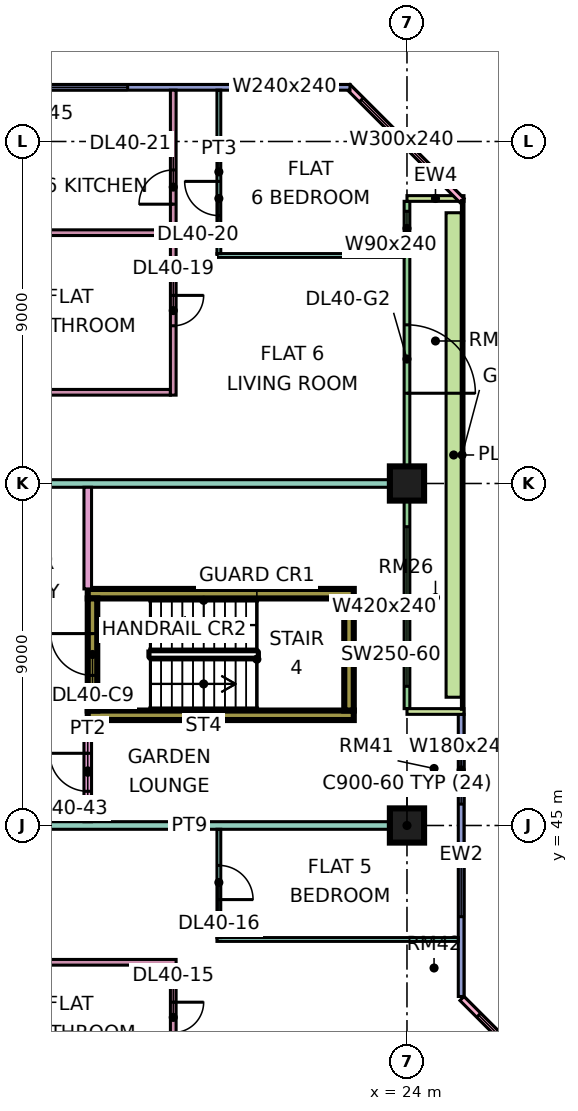
"""IFC4 building model, lengths in metres.
Left out: names, types, materials, properties, quantities, classifications, styles, units other than length and angle.
Written with IfcOpenShell. Run it as: python <this file> out.ifc"""

import sys

from ifc_helpers import new_model, si_unit, direction, frame, frame_2d, origin, origin_2d, place, context, subcontext, project, spatial, rectangle, extrude, element, fill, save


model = new_model("IFC4")
c1 = context("Model", 3, precision=1e-05, world=origin(), true_north=direction((0.0, 1.0)))
c2 = subcontext(c1, "Body", "Model", "MODEL_VIEW")
j1 = project(units=[si_unit("LENGTHUNIT", "METRE"), si_unit("PLANEANGLEUNIT", "RADIAN")], contexts=[c1])
p1 = place(None, origin())
s1 = spatial("IfcSite", under=j1, at=p1, CompositionType="ELEMENT")
p2 = place(p1, origin())
s2 = spatial("IfcBuilding", under=s1, at=p2, CompositionType="ELEMENT")
p3 = place(p2, frame((0.0, 0.0, 176.15)))
s3 = spatial("IfcBuildingStorey", under=s2, at=p3, CompositionType="ELEMENT", Elevation=176.15)
for number, where, z_axis, x_axis in (
    (1, (24.0, 45.0, 0.0), (0.0, 0.0, 1.0), (1.0, 0.0, 0.0)),
    (2, (24.0, 54.0, 0.0), (0.0, 0.0, 1.0), (1.0, 0.0, 0.0)),
):
    element("IfcColumn", number, at=place(p3, frame(where, z_axis=z_axis, x_axis=x_axis)), inside=s3, PredefinedType="COLUMN", context=c2, shape_type="SweptSolid", body=[
        extrude(rectangle(XDim=0.9, YDim=0.9, at=origin_2d()), origin(), (0.0, 0.0, 1.0), 3.75),
    ])
for number, where, z_axis, x_axis in (
    (3, (15.6, 47.9, 0.0), (0.0, 0.0, 1.0), (1.0, 0.0, 0.0)),
    (4, (15.6, 51.1, 0.0), (0.0, 0.0, 1.0), (1.0, 0.0, 0.0)),
):
    element("IfcWall", number, at=place(p3, frame(where, z_axis=z_axis, x_axis=x_axis)), inside=s3, PredefinedType="SHEAR", context=c2, shape_type="SweptSolid", body=[
        extrude(rectangle(XDim=7.0, YDim=0.25, at=frame_2d((3.5, 0.0))), origin(), (0.0, 0.0, 1.0), 3.75),
    ])
p4 = place(p3, frame((15.725, 48.025, 0.0), z_axis=(0.0, 0.0, 1.0), x_axis=(0.0, 1.0, 0.0)))
e5 = element("IfcWall", 5, at=p4, inside=s3, PredefinedType="SHEAR", context=c2, shape_type="SweptSolid", body=[
    extrude(rectangle(XDim=2.95, YDim=0.25, at=frame_2d((1.475, 0.0))), origin(), (0.0, 0.0, 1.0), 3.75),
])
p5 = place(p4, frame((0.925, 0.0, 0.0)))
e6 = element("IfcOpeningElement", 6, at=p5, cuts=e5, PredefinedType="OPENING", context=c2, shape_type="SweptSolid", body=[
    extrude(rectangle(XDim=1.1, YDim=2.2, at=frame_2d((0.55, 1.1))), frame((0.0, 0.135, 0.0), z_axis=(0.0, -1.0, 0.0), x_axis=(1.0, 0.0, 0.0)), (0.0, 0.0, 1.0), 0.27),
])
p6 = place(p3, frame((22.475, 48.025, 0.0), z_axis=(0.0, 0.0, 1.0), x_axis=(0.0, 1.0, 0.0)))
e7 = element("IfcWall", 7, at=p6, inside=s3, PredefinedType="SHEAR", context=c2, shape_type="SweptSolid", body=[
    extrude(rectangle(XDim=2.95, YDim=0.25, at=frame_2d((1.475, 0.0))), origin(), (0.0, 0.0, 1.0), 3.75),
])
p7 = place(p3, frame((28.447, 37.447, 0.0), z_axis=(0.0, 0.0, 1.0), x_axis=(-0.707106781187, 0.707106781187, 0.0)))
e8 = element("IfcWall", 8, at=p7, inside=s3, PredefinedType="SOLIDWALL", context=c2, shape_type="SweptSolid", body=[
    extrude(rectangle(XDim=4.243, YDim=0.15, at=frame_2d((2.121, 0.0))), origin(), (0.0, 0.0, 1.0), 3.35),
])
p8 = place(p7, frame((0.621, 0.0, 0.45)))
e9 = element("IfcOpeningElement", 9, at=p8, cuts=e8, PredefinedType="OPENING", context=c2, shape_type="SweptSolid", body=[
    extrude(rectangle(XDim=3.0, YDim=2.4, at=frame_2d((1.5, 1.2))), frame((0.0, 0.085, 0.0), z_axis=(0.0, -1.0, 0.0), x_axis=(1.0, 0.0, 0.0)), (0.0, 0.0, 1.0), 0.17),
])
p9 = place(p3, frame((25.425, 40.5, 0.0), z_axis=(0.0, 0.0, 1.0), x_axis=(0.0, 1.0, 0.0)))
e10 = element("IfcWall", 10, at=p9, inside=s3, PredefinedType="SOLIDWALL", context=c2, shape_type="SweptSolid", body=[
    extrude(rectangle(XDim=7.425, YDim=0.15, at=frame_2d((3.712, 0.0))), origin(), (0.0, 0.0, 1.0), 3.35),
])
p10 = place(p9, frame((2.1, 0.0, 0.45)))
e11 = element("IfcOpeningElement", 11, at=p10, cuts=e10, PredefinedType="OPENING", context=c2, shape_type="SweptSolid", body=[
    extrude(rectangle(XDim=1.8, YDim=2.4, at=frame_2d((0.9, 1.2))), frame((0.0, 0.085, 0.0), z_axis=(0.0, -1.0, 0.0), x_axis=(1.0, 0.0, 0.0)), (0.0, 0.0, 1.0), 0.17),
])
p11 = place(p9, frame((5.062, 0.0, 0.45)))
e12 = element("IfcOpeningElement", 12, at=p11, cuts=e10, PredefinedType="OPENING", context=c2, shape_type="SweptSolid", body=[
    extrude(rectangle(XDim=1.8, YDim=2.4, at=frame_2d((0.9, 1.2))), frame((0.0, 0.085, 0.0), z_axis=(0.0, -1.0, 0.0), x_axis=(1.0, 0.0, 0.0)), (0.0, 0.0, 1.0), 0.17),
])
p12 = place(p3, frame((24.0, 48.075, 0.0), z_axis=(0.0, 0.0, 1.0), x_axis=(0.0, 1.0, 0.0)))
e13 = element("IfcWall", 13, at=p12, inside=s3, PredefinedType="SOLIDWALL", context=c2, shape_type="SweptSolid", body=[
    extrude(rectangle(XDim=13.35, YDim=0.15, at=frame_2d((6.675, 0.0))), origin(), (0.0, 0.0, 1.0), 3.35),
])
p13 = place(p12, frame((0.587, 0.0, 0.45)))
e14 = element("IfcOpeningElement", 14, at=p13, cuts=e13, PredefinedType="OPENING", context=c2, shape_type="SweptSolid", body=[
    extrude(rectangle(XDim=4.2, YDim=2.4, at=frame_2d((2.1, 1.2))), frame((0.0, 0.085, 0.0), z_axis=(0.0, -1.0, 0.0), x_axis=(1.0, 0.0, 0.0)), (0.0, 0.0, 1.0), 0.17),
])
p14 = place(p12, frame((8.3, 0.0, 0.0)))
e15 = element("IfcOpeningElement", 15, at=p14, cuts=e13, PredefinedType="OPENING", context=c2, shape_type="SweptSolid", body=[
    extrude(rectangle(XDim=1.8, YDim=2.4, at=frame_2d((0.9, 1.2))), frame((0.0, 0.085, 0.0), z_axis=(0.0, -1.0, 0.0), x_axis=(1.0, 0.0, 0.0)), (0.0, 0.0, 1.0), 0.17),
])
p15 = place(p12, frame((12.188, 0.0, 0.45)))
e16 = element("IfcOpeningElement", 16, at=p15, cuts=e13, PredefinedType="OPENING", context=c2, shape_type="SweptSolid", body=[
    extrude(rectangle(XDim=0.9, YDim=2.4, at=frame_2d((0.45, 1.2))), frame((0.0, 0.085, 0.0), z_axis=(0.0, -1.0, 0.0), x_axis=(1.0, 0.0, 0.0)), (0.0, 0.0, 1.0), 0.17),
])
for number, where, z_axis, x_axis in (
    (17, (25.5, 48.0, 0.0), (0.0, 0.0, 1.0), (-1.0, 0.0, 0.0)),
    (18, (25.5, 61.5, 0.0), (0.0, 0.0, 1.0), (-1.0, 0.0, 0.0)),
):
    element("IfcWall", number, at=place(p3, frame(where, z_axis=z_axis, x_axis=x_axis)), inside=s3, PredefinedType="SOLIDWALL", context=c2, shape_type="SweptSolid", body=[
        extrude(rectangle(XDim=1.5, YDim=0.15, at=frame_2d((0.75, 0.0))), origin(), (0.0, 0.0, 1.0), 3.35),
    ])
p16 = place(p3, frame((25.447, 61.447, 0.0), z_axis=(0.0, 0.0, 1.0), x_axis=(-0.707106781187, 0.707106781187, 0.0)))
e19 = element("IfcWall", 19, at=p16, inside=s3, PredefinedType="SOLIDWALL", context=c2, shape_type="SweptSolid", body=[
    extrude(rectangle(XDim=4.243, YDim=0.15, at=frame_2d((2.121, 0.0))), origin(), (0.0, 0.0, 1.0), 3.35),
])
p17 = place(p16, frame((0.744, 0.0, 0.45)))
e20 = element("IfcOpeningElement", 20, at=p17, cuts=e19, PredefinedType="OPENING", context=c2, shape_type="SweptSolid", body=[
    extrude(rectangle(XDim=3.0, YDim=2.4, at=frame_2d((1.5, 1.2))), frame((0.0, 0.085, 0.0), z_axis=(0.0, -1.0, 0.0), x_axis=(1.0, 0.0, 0.0)), (0.0, 0.0, 1.0), 0.17),
])
p18 = place(p3, frame((22.5, 64.425, 0.0), z_axis=(0.0, 0.0, 1.0), x_axis=(-1.0, 0.0, 0.0)))
e21 = element("IfcWall", 21, at=p18, inside=s3, PredefinedType="SOLIDWALL", context=c2, shape_type="SweptSolid", body=[
    extrude(rectangle(XDim=10.425, YDim=0.15, at=frame_2d((5.212, 0.0))), origin(), (0.0, 0.0, 1.0), 3.35),
])
p19 = place(p18, frame((0.525, 0.0, 0.45)))
e22 = element("IfcOpeningElement", 22, at=p19, cuts=e21, PredefinedType="OPENING", context=c2, shape_type="SweptSolid", body=[
    extrude(rectangle(XDim=2.4, YDim=2.4, at=frame_2d((1.2, 1.2))), frame((0.0, 0.085, 0.0), z_axis=(0.0, -1.0, 0.0), x_axis=(1.0, 0.0, 0.0)), (0.0, 0.0, 1.0), 0.17),
])
p20 = place(p18, frame((5.85, 0.0, 0.45)))
e23 = element("IfcOpeningElement", 23, at=p20, cuts=e21, PredefinedType="OPENING", context=c2, shape_type="SweptSolid", body=[
    extrude(rectangle(XDim=3.0, YDim=2.4, at=frame_2d((1.5, 1.2))), frame((0.0, 0.085, 0.0), z_axis=(0.0, -1.0, 0.0), x_axis=(1.0, 0.0, 0.0)), (0.0, 0.0, 1.0), 0.17),
])
p21 = place(p3, frame((25.229, 48.375, 0.0), z_axis=(0.0, 0.0, 1.0), x_axis=(0.0, 1.0, 0.0)))
e24 = element("IfcWall", 24, at=p21, inside=s3, PredefinedType="SOLIDWALL", context=c2, shape_type="SweptSolid", body=[
    extrude(rectangle(XDim=12.75, YDim=0.4, at=frame_2d((6.375, 0.0))), origin(), (0.0, 0.0, 1.0), 0.7),
])
p22 = place(p3, frame((12.55, 41.4, 0.0), z_axis=(0.0, 0.0, 1.0), x_axis=(1.0, 0.0, 0.0)))
e25 = element("IfcWall", 25, at=p22, inside=s3, PredefinedType="PARTITIONING", context=c2, shape_type="SweptSolid", body=[
    extrude(rectangle(XDim=5.375, YDim=0.15, at=frame_2d((2.688, 0.0))), origin(), (0.0, 0.0, 1.0), 3.35),
])
p23 = place(p3, frame((12.55, 45.0, 0.0), z_axis=(0.0, 0.0, 1.0), x_axis=(1.0, 0.0, 0.0)))
e26 = element("IfcWall", 26, at=p23, inside=s3, PredefinedType="PARTITIONING", context=c2, shape_type="SweptSolid", body=[
    extrude(rectangle(XDim=11.45, YDim=0.2, at=frame_2d((5.725, 0.0))), origin(), (0.0, 0.0, 1.0), 3.35),
])
p24 = place(p3, frame((12.55, 54.0, 0.0), z_axis=(0.0, 0.0, 1.0), x_axis=(1.0, 0.0, 0.0)))
e27 = element("IfcWall", 27, at=p24, inside=s3, PredefinedType="PARTITIONING", context=c2, shape_type="SweptSolid", body=[
    extrude(rectangle(XDim=11.376, YDim=0.2, at=frame_2d((5.688, 0.0))), origin(), (0.0, 0.0, 1.0), 3.35),
])
for number, where, z_axis, x_axis in (
    (28, (12.55, 56.4, 0.0), (0.0, 0.0, 1.0), (1.0, 0.0, 0.0)),
    (29, (12.55, 60.6, 0.0), (0.0, 0.0, 1.0), (1.0, 0.0, 0.0)),
):
    element("IfcWall", number, at=place(p3, frame(where, z_axis=z_axis, x_axis=x_axis)), inside=s3, PredefinedType="PARTITIONING", context=c2, shape_type="SweptSolid", body=[
        extrude(rectangle(XDim=5.225, YDim=0.15, at=frame_2d((2.612, 0.0))), origin(), (0.0, 0.0, 1.0), 3.35),
    ])
p25 = place(p3, frame((15.6, 45.1, 0.0), z_axis=(0.0, 0.0, 1.0), x_axis=(0.0, 1.0, 0.0)))
e30 = element("IfcWall", 30, at=p25, inside=s3, PredefinedType="PARTITIONING", context=c2, shape_type="SweptSolid", body=[
    extrude(rectangle(XDim=2.675, YDim=0.2, at=frame_2d((1.337, 0.0))), origin(), (0.0, 0.0, 1.0), 3.35),
])
p26 = place(p25, frame((0.8, 0.0, 0.0)))
e31 = element("IfcOpeningElement", 31, at=p26, cuts=e30, PredefinedType="OPENING", context=c2, shape_type="SweptSolid", body=[
    extrude(rectangle(XDim=1.0, YDim=2.1, at=frame_2d((0.5, 1.05))), frame((0.0, 0.11, 0.0), z_axis=(0.0, -1.0, 0.0), x_axis=(1.0, 0.0, 0.0)), (0.0, 0.0, 1.0), 0.22),
])
p27 = place(p3, frame((15.6, 51.225, 0.0), z_axis=(0.0, 0.0, 1.0), x_axis=(0.0, 1.0, 0.0)))
e32 = element("IfcWall", 32, at=p27, inside=s3, PredefinedType="PARTITIONING", context=c2, shape_type="SweptSolid", body=[
    extrude(rectangle(XDim=2.675, YDim=0.2, at=frame_2d((1.337, 0.0))), origin(), (0.0, 0.0, 1.0), 3.35),
])
p28 = place(p3, frame((17.85, 36.1, 0.0), z_axis=(0.0, 0.0, 1.0), x_axis=(0.0, 1.0, 0.0)))
e33 = element("IfcWall", 33, at=p28, inside=s3, PredefinedType="PARTITIONING", context=c2, shape_type="SweptSolid", body=[
    extrude(rectangle(XDim=5.225, YDim=0.15, at=frame_2d((2.612, 0.0))), origin(), (0.0, 0.0, 1.0), 3.35),
])
p29 = place(p28, frame((3.45, 0.0, 0.0)))
e34 = element("IfcOpeningElement", 34, at=p29, cuts=e33, PredefinedType="OPENING", context=c2, shape_type="SweptSolid", body=[
    extrude(rectangle(XDim=0.8, YDim=2.1, at=frame_2d((0.4, 1.05))), frame((0.0, 0.085, 0.0), z_axis=(0.0, -1.0, 0.0), x_axis=(1.0, 0.0, 0.0)), (0.0, 0.0, 1.0), 0.17),
])
p30 = place(p28, frame((0.65, 0.0, 0.0)))
e35 = element("IfcOpeningElement", 35, at=p30, cuts=e33, PredefinedType="OPENING", context=c2, shape_type="SweptSolid", body=[
    extrude(rectangle(XDim=0.9, YDim=2.1, at=frame_2d((0.45, 1.05))), frame((0.0, 0.085, 0.0), z_axis=(0.0, -1.0, 0.0), x_axis=(1.0, 0.0, 0.0)), (0.0, 0.0, 1.0), 0.17),
])
p31 = place(p3, frame((17.85, 56.325, 0.0), z_axis=(0.0, 0.0, 1.0), x_axis=(0.0, 1.0, 0.0)))
e36 = element("IfcWall", 36, at=p31, inside=s3, PredefinedType="PARTITIONING", context=c2, shape_type="SweptSolid", body=[
    extrude(rectangle(XDim=8.025, YDim=0.15, at=frame_2d((4.013, 0.0))), origin(), (0.0, 0.0, 1.0), 3.35),
])
p32 = place(p31, frame((1.825, 0.0, 0.0)))
e37 = element("IfcOpeningElement", 37, at=p32, cuts=e36, PredefinedType="OPENING", context=c2, shape_type="SweptSolid", body=[
    extrude(rectangle(XDim=0.8, YDim=2.1, at=frame_2d((0.4, 1.05))), frame((0.0, 0.085, 0.0), z_axis=(0.0, -1.0, 0.0), x_axis=(1.0, 0.0, 0.0)), (0.0, 0.0, 1.0), 0.17),
])
p33 = place(p31, frame((5.025, 0.0, 0.0)))
e38 = element("IfcOpeningElement", 38, at=p33, cuts=e36, PredefinedType="OPENING", context=c2, shape_type="SweptSolid", body=[
    extrude(rectangle(XDim=0.9, YDim=2.1, at=frame_2d((0.45, 1.05))), frame((0.0, 0.085, 0.0), z_axis=(0.0, -1.0, 0.0), x_axis=(1.0, 0.0, 0.0)), (0.0, 0.0, 1.0), 0.17),
])
p34 = place(p3, frame((19.0, 42.0, 0.0), z_axis=(0.0, 0.0, 1.0), x_axis=(1.0, 0.0, 0.0)))
e39 = element("IfcWall", 39, at=p34, inside=s3, PredefinedType="PARTITIONING", context=c2, shape_type="SweptSolid", body=[
    extrude(rectangle(XDim=6.35, YDim=0.1, at=frame_2d((3.175, 0.0))), origin(), (0.0, 0.0, 1.0), 3.35),
])
p35 = place(p3, frame((19.0, 60.0, 0.0), z_axis=(0.0, 0.0, 1.0), x_axis=(1.0, 0.0, 0.0)))
e40 = element("IfcWall", 40, at=p35, inside=s3, PredefinedType="PARTITIONING", context=c2, shape_type="SweptSolid", body=[
    extrude(rectangle(XDim=4.926, YDim=0.1, at=frame_2d((2.463, 0.0))), origin(), (0.0, 0.0, 1.0), 3.35),
])
p36 = place(p3, frame((19.05, 42.05, 0.0), z_axis=(0.0, 0.0, 1.0), x_axis=(0.0, 1.0, 0.0)))
e41 = element("IfcWall", 41, at=p36, inside=s3, PredefinedType="PARTITIONING", context=c2, shape_type="SweptSolid", body=[
    extrude(rectangle(XDim=2.85, YDim=0.1, at=frame_2d((1.425, 0.0))), origin(), (0.0, 0.0, 1.0), 3.35),
])
p37 = place(p36, frame((1.0, 0.0, 0.0)))
e42 = element("IfcOpeningElement", 42, at=p37, cuts=e41, PredefinedType="OPENING", context=c2, shape_type="SweptSolid", body=[
    extrude(rectangle(XDim=0.9, YDim=2.1, at=frame_2d((0.45, 1.05))), frame((0.0, 0.06, 0.0), z_axis=(0.0, -1.0, 0.0), x_axis=(1.0, 0.0, 0.0)), (0.0, 0.0, 1.0), 0.12),
])
p38 = place(p3, frame((19.05, 60.05, 0.0), z_axis=(0.0, 0.0, 1.0), x_axis=(0.0, 1.0, 0.0)))
e43 = element("IfcWall", 43, at=p38, inside=s3, PredefinedType="PARTITIONING", context=c2, shape_type="SweptSolid", body=[
    extrude(rectangle(XDim=4.301, YDim=0.1, at=frame_2d((2.15, 0.0))), origin(), (0.0, 0.0, 1.0), 3.35),
])
p39 = place(p38, frame((1.0, 0.0, 0.0)))
e44 = element("IfcOpeningElement", 44, at=p39, cuts=e43, PredefinedType="OPENING", context=c2, shape_type="SweptSolid", body=[
    extrude(rectangle(XDim=0.9, YDim=2.1, at=frame_2d((0.45, 1.05))), frame((0.0, 0.06, 0.0), z_axis=(0.0, -1.0, 0.0), x_axis=(1.0, 0.0, 0.0)), (0.0, 0.0, 1.0), 0.12),
])
p40 = place(p8, origin())
e45 = element("IfcWindow", 45, at=p40, inside=s3, PartitioningType="SINGLE_PANEL", PredefinedType="WINDOW", context=c2, shape_type="SweptSolid", body=[
    extrude(rectangle(XDim=3.0, YDim=2.4, at=frame_2d((1.5, 1.2))), frame((0.0, 0.03, 0.0), z_axis=(0.0, -1.0, 0.0), x_axis=(1.0, 0.0, 0.0)), (0.0, 0.0, 1.0), 0.06),
])
fill(e9, e45)
p41 = place(p10, origin())
e46 = element("IfcWindow", 46, at=p41, inside=s3, PartitioningType="SINGLE_PANEL", PredefinedType="WINDOW", context=c2, shape_type="SweptSolid", body=[
    extrude(rectangle(XDim=1.8, YDim=2.4, at=frame_2d((0.9, 1.2))), frame((0.0, 0.03, 0.0), z_axis=(0.0, -1.0, 0.0), x_axis=(1.0, 0.0, 0.0)), (0.0, 0.0, 1.0), 0.06),
])
fill(e11, e46)
p42 = place(p11, origin())
e47 = element("IfcWindow", 47, at=p42, inside=s3, PartitioningType="SINGLE_PANEL", PredefinedType="WINDOW", context=c2, shape_type="SweptSolid", body=[
    extrude(rectangle(XDim=1.8, YDim=2.4, at=frame_2d((0.9, 1.2))), frame((0.0, 0.03, 0.0), z_axis=(0.0, -1.0, 0.0), x_axis=(1.0, 0.0, 0.0)), (0.0, 0.0, 1.0), 0.06),
])
fill(e12, e47)
p43 = place(p13, origin())
e48 = element("IfcWindow", 48, at=p43, inside=s3, PartitioningType="SINGLE_PANEL", PredefinedType="WINDOW", context=c2, shape_type="SweptSolid", body=[
    extrude(rectangle(XDim=4.2, YDim=2.4, at=frame_2d((2.1, 1.2))), frame((0.0, 0.03, 0.0), z_axis=(0.0, -1.0, 0.0), x_axis=(1.0, 0.0, 0.0)), (0.0, 0.0, 1.0), 0.06),
])
fill(e14, e48)
p44 = place(p14, frame((1.8, 0.0, 0.0), z_axis=(0.0, 0.0, 1.0), x_axis=(-1.0, 0.0, 0.0)))
e49 = element("IfcDoor", 49, at=p44, inside=s3, OperationType="DOUBLE_DOOR_SINGLE_SWING", PredefinedType="DOOR", context=c2, shape_type="SweptSolid", body=[
    extrude(rectangle(XDim=1.8, YDim=2.4, at=frame_2d((0.9, 1.2))), frame((0.0, 0.025, 0.0), z_axis=(0.0, -1.0, 0.0), x_axis=(1.0, 0.0, 0.0)), (0.0, 0.0, 1.0), 0.05),
])
fill(e15, e49)
p45 = place(p15, origin())
e50 = element("IfcWindow", 50, at=p45, inside=s3, PartitioningType="SINGLE_PANEL", PredefinedType="WINDOW", context=c2, shape_type="SweptSolid", body=[
    extrude(rectangle(XDim=0.9, YDim=2.4, at=frame_2d((0.45, 1.2))), frame((0.0, 0.03, 0.0), z_axis=(0.0, -1.0, 0.0), x_axis=(1.0, 0.0, 0.0)), (0.0, 0.0, 1.0), 0.06),
])
fill(e16, e50)
p46 = place(p17, origin())
e51 = element("IfcWindow", 51, at=p46, inside=s3, PartitioningType="SINGLE_PANEL", PredefinedType="WINDOW", context=c2, shape_type="SweptSolid", body=[
    extrude(rectangle(XDim=3.0, YDim=2.4, at=frame_2d((1.5, 1.2))), frame((0.0, 0.03, 0.0), z_axis=(0.0, -1.0, 0.0), x_axis=(1.0, 0.0, 0.0)), (0.0, 0.0, 1.0), 0.06),
])
fill(e20, e51)
p47 = place(p19, origin())
e52 = element("IfcWindow", 52, at=p47, inside=s3, PartitioningType="SINGLE_PANEL", PredefinedType="WINDOW", context=c2, shape_type="SweptSolid", body=[
    extrude(rectangle(XDim=2.4, YDim=2.4, at=frame_2d((1.2, 1.2))), frame((0.0, 0.03, 0.0), z_axis=(0.0, -1.0, 0.0), x_axis=(1.0, 0.0, 0.0)), (0.0, 0.0, 1.0), 0.06),
])
fill(e22, e52)
p48 = place(p20, origin())
e53 = element("IfcWindow", 53, at=p48, inside=s3, PartitioningType="SINGLE_PANEL", PredefinedType="WINDOW", context=c2, shape_type="SweptSolid", body=[
    extrude(rectangle(XDim=3.0, YDim=2.4, at=frame_2d((1.5, 1.2))), frame((0.0, 0.03, 0.0), z_axis=(0.0, -1.0, 0.0), x_axis=(1.0, 0.0, 0.0)), (0.0, 0.0, 1.0), 0.06),
])
fill(e23, e53)
p49 = place(p5, frame((1.1, 0.0, 0.0), z_axis=(0.0, 0.0, 1.0), x_axis=(-1.0, 0.0, 0.0)))
e54 = element("IfcDoor", 54, at=p49, inside=s3, OperationType="SINGLE_SWING_RIGHT", PredefinedType="DOOR", context=c2, shape_type="SweptSolid", body=[
    extrude(rectangle(XDim=1.1, YDim=2.2, at=frame_2d((0.55, 1.1))), frame((0.0, 0.025, 0.0), z_axis=(0.0, -1.0, 0.0), x_axis=(1.0, 0.0, 0.0)), (0.0, 0.0, 1.0), 0.05),
])
fill(e6, e54)
p50 = place(p29, origin())
e55 = element("IfcDoor", 55, at=p50, inside=s3, OperationType="SINGLE_SWING_RIGHT", PredefinedType="DOOR", context=c2, shape_type="SweptSolid", body=[
    extrude(rectangle(XDim=0.8, YDim=2.1, at=frame_2d((0.4, 1.05))), frame((0.0, 0.025, 0.0), z_axis=(0.0, -1.0, 0.0), x_axis=(1.0, 0.0, 0.0)), (0.0, 0.0, 1.0), 0.05),
])
fill(e34, e55)
p51 = place(p37, frame((0.9, 0.0, 0.0), z_axis=(0.0, 0.0, 1.0), x_axis=(-1.0, 0.0, 0.0)))
e56 = element("IfcDoor", 56, at=p51, inside=s3, OperationType="SINGLE_SWING_LEFT", PredefinedType="DOOR", context=c2, shape_type="SweptSolid", body=[
    extrude(rectangle(XDim=0.9, YDim=2.1, at=frame_2d((0.45, 1.05))), frame((0.0, 0.025, 0.0), z_axis=(0.0, -1.0, 0.0), x_axis=(1.0, 0.0, 0.0)), (0.0, 0.0, 1.0), 0.05),
])
fill(e42, e56)
p52 = place(p32, origin())
e57 = element("IfcDoor", 57, at=p52, inside=s3, OperationType="SINGLE_SWING_RIGHT", PredefinedType="DOOR", context=c2, shape_type="SweptSolid", body=[
    extrude(rectangle(XDim=0.8, YDim=2.1, at=frame_2d((0.4, 1.05))), frame((0.0, 0.025, 0.0), z_axis=(0.0, -1.0, 0.0), x_axis=(1.0, 0.0, 0.0)), (0.0, 0.0, 1.0), 0.05),
])
fill(e37, e57)
p53 = place(p39, frame((0.9, 0.0, 0.0), z_axis=(0.0, 0.0, 1.0), x_axis=(-1.0, 0.0, 0.0)))
e58 = element("IfcDoor", 58, at=p53, inside=s3, OperationType="SINGLE_SWING_RIGHT", PredefinedType="DOOR", context=c2, shape_type="SweptSolid", body=[
    extrude(rectangle(XDim=0.9, YDim=2.1, at=frame_2d((0.45, 1.05))), frame((0.0, 0.025, 0.0), z_axis=(0.0, -1.0, 0.0), x_axis=(1.0, 0.0, 0.0)), (0.0, 0.0, 1.0), 0.05),
])
fill(e44, e58)
p54 = place(p33, origin())
e59 = element("IfcDoor", 59, at=p54, inside=s3, OperationType="SINGLE_SWING_LEFT", PredefinedType="DOOR", context=c2, shape_type="SweptSolid", body=[
    extrude(rectangle(XDim=0.9, YDim=2.1, at=frame_2d((0.45, 1.05))), frame((0.0, 0.025, 0.0), z_axis=(0.0, -1.0, 0.0), x_axis=(1.0, 0.0, 0.0)), (0.0, 0.0, 1.0), 0.05),
])
fill(e38, e59)
p55 = place(p26, frame((1.0, 0.0, 0.0), z_axis=(0.0, 0.0, 1.0), x_axis=(-1.0, 0.0, 0.0)))
e60 = element("IfcDoor", 60, at=p55, inside=s3, OperationType="SINGLE_SWING_RIGHT", PredefinedType="DOOR", context=c2, shape_type="SweptSolid", body=[
    extrude(rectangle(XDim=1.0, YDim=2.1, at=frame_2d((0.5, 1.05))), frame((0.0, 0.025, 0.0), z_axis=(0.0, -1.0, 0.0), x_axis=(1.0, 0.0, 0.0)), (0.0, 0.0, 1.0), 0.05),
])
fill(e31, e60)
save(model, sys.argv[1])
